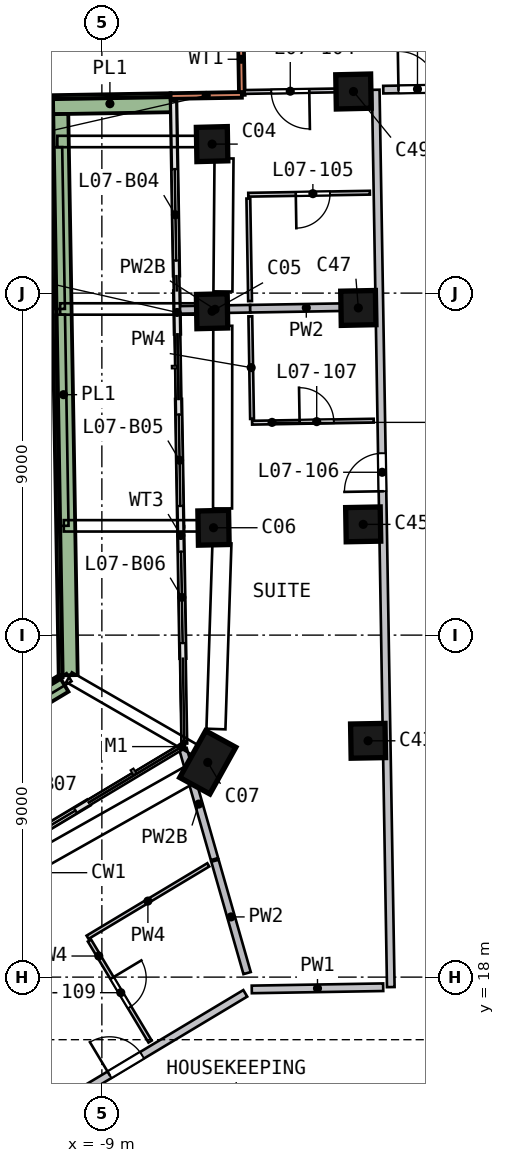
"""IFC4 building model, lengths in metres.
Left out: names, types, materials, properties, quantities, classifications, styles, units other than length and angle.
Written with IfcOpenShell. Run it as: python <this file> out.ifc"""

import sys

from ifc_helpers import new_model, si_unit, direction, frame, frame_2d, origin, origin_2d, place, context, subcontext, project, spatial, rectangle, extrude, element, fill, save


model = new_model("IFC4")
c1 = context("Model", 3, precision=1e-05, world=origin(), true_north=direction((0.0, 1.0)))
c2 = subcontext(c1, "Body", "Model", "MODEL_VIEW")
j1 = project(units=[si_unit("LENGTHUNIT", "METRE"), si_unit("PLANEANGLEUNIT", "RADIAN")], contexts=[c1])
p1 = place(None, origin())
s1 = spatial("IfcSite", under=j1, at=p1, CompositionType="ELEMENT")
p2 = place(p1, origin())
s2 = spatial("IfcBuilding", under=s1, at=p2, CompositionType="ELEMENT")
p3 = place(p2, frame((0.0, 0.0, 39.0)))
s3 = spatial("IfcBuildingStorey", under=s2, at=p3, CompositionType="ELEMENT", Elevation=39.0)
p4 = place(p3, frame((-5.871, 39.982, 0.0), z_axis=(-0.186896641, -0.049859128, 0.981113507), x_axis=(0.025350334, -0.998623416, -0.045919866)))
e1 = element("IfcColumn", 1, at=p4, inside=s3, PredefinedType="COLUMN", context=c2, shape_type="SweptSolid", body=[
    extrude(rectangle(XDim=0.9, YDim=0.8, at=origin_2d()), origin(), (0.0, 0.0, 1.0), 3.251),
])
p5 = place(p3, frame((-5.897, 35.576, 0.0), z_axis=(-0.167057669, -0.043045997, 0.985006994), x_axis=(0.023247701, -0.998940686, -0.039712094)))
e2 = element("IfcColumn", 2, at=p5, inside=s3, PredefinedType="COLUMN", context=c2, shape_type="SweptSolid", body=[
    extrude(rectangle(XDim=0.9, YDim=0.8, at=origin_2d()), origin(), (0.0, 0.0, 1.0), 3.239),
])
p6 = place(p3, frame((-5.891, 29.869, 0.0), z_axis=(-0.140990235, -0.036042617, 0.98935468), x_axis=(0.021432228, -0.999213991, -0.033347547)))
e3 = element("IfcColumn", 3, at=p6, inside=s3, PredefinedType="COLUMN", context=c2, shape_type="SweptSolid", body=[
    extrude(rectangle(XDim=0.9, YDim=0.8, at=origin_2d()), origin(), (0.0, 0.0, 1.0), 3.224),
])
p7 = place(p3, frame((-6.078, 23.686, 0.0), z_axis=(-0.112426319, -0.029797915, 0.993213173), x_axis=(0.478316462, 0.874501313, 0.080379195)))
e4 = element("IfcColumn", 4, at=p7, inside=s3, PredefinedType="COLUMN", context=c2, shape_type="SweptSolid", body=[
    extrude(rectangle(XDim=1.4, YDim=0.9, at=origin_2d()), origin(), (0.0, 0.0, 1.0), 3.212),
])
p8 = place(p3, frame((-1.856, 24.231, 0.0), z_axis=(-0.115172592, -0.009806775, 0.993297086), x_axis=(-0.017769532, 0.9998116, 0.007810719)))
e5 = element("IfcColumn", 5, at=p8, inside=s3, PredefinedType="COLUMN", context=c2, shape_type="SweptSolid", body=[
    extrude(rectangle(XDim=0.9, YDim=0.9, at=origin_2d()), origin(), (0.0, 0.0, 1.0), 3.211),
])
p9 = place(p3, frame((-1.952, 29.936, 0.0), z_axis=(-0.141505942, -0.017423109, 0.989784069), x_axis=(-0.018997454, 0.999708772, 0.014881813)))
e6 = element("IfcColumn", 6, at=p9, inside=s3, PredefinedType="COLUMN", context=c2, shape_type="SweptSolid", body=[
    extrude(rectangle(XDim=0.9, YDim=0.9, at=origin_2d()), origin(), (0.0, 0.0, 1.0), 3.223),
])
p10 = place(p3, frame((-2.047, 35.64, 0.0), z_axis=(-0.167600433, -0.024966581, 0.985538819), x_axis=(-0.020538414, 0.999550738, 0.021828788)))
e7 = element("IfcColumn", 7, at=p10, inside=s3, PredefinedType="COLUMN", context=c2, shape_type="SweptSolid", body=[
    extrude(rectangle(XDim=0.9, YDim=0.9, at=origin_2d()), origin(), (0.0, 0.0, 1.0), 3.237),
])
p11 = place(p3, frame((-2.143, 41.345, 0.0), z_axis=(-0.193255586, -0.032421908, 0.980612614), x_axis=(-0.022494025, 0.999337582, 0.028607969)))
e8 = element("IfcColumn", 8, at=p11, inside=s3, PredefinedType="COLUMN", context=c2, shape_type="SweptSolid", body=[
    extrude(rectangle(XDim=0.9, YDim=0.9, at=origin_2d()), origin(), (0.0, 0.0, 1.0), 3.253),
])
for number, where, z_axis, x_axis in (
    (9, (-5.348, 43.092, 0.0), (0.0, 0.0, 1.0), (0.017, -1.0, 0.0)),
    (10, (-5.316, 41.217, 0.0), (0.0, 0.0, 1.0), (-1.0, -0.017, 0.0)),
):
    element("IfcWall", number, at=place(p3, frame(where, z_axis=z_axis, x_axis=x_axis)), inside=s3, PredefinedType="SOLIDWALL", context=c2, shape_type="SweptSolid", body=[
        extrude(rectangle(XDim=1.875, YDim=0.15, at=frame_2d((0.938, 0.0))), origin(), (0.0, 0.0, 1.0), 3.19),
    ])
p12 = place(p3, frame((-7.114, 41.042, 0.0), z_axis=(0.0, 0.0, 1.0), x_axis=(0.016730938, -0.999860028, 0.0)))
e11 = element("IfcWall", 11, at=p12, inside=s3, PredefinedType="SOLIDWALL", context=c2, shape_type="SweptSolid", body=[
    extrude(rectangle(XDim=4.582, YDim=0.15, at=frame_2d((2.291, 0.0))), origin(), (0.0, 0.0, 1.0), 2.425),
])
p13 = place(p12, frame((1.782, 0.0, 0.0)))
e12 = element("IfcOpeningElement", 12, at=p13, cuts=e11, PredefinedType="OPENING", context=c2, shape_type="SweptSolid", body=[
    extrude(rectangle(XDim=2.4, YDim=2.4, at=frame_2d((1.2, 1.2))), frame((0.0, 0.085, 0.0), z_axis=(0.0, -1.0, 0.0), x_axis=(1.0, 0.0, 0.0)), (0.0, 0.0, 1.0), 0.17),
])
p14 = place(p3, frame((-6.982, 33.202, 0.0), z_axis=(0.0, 0.0, 1.0), x_axis=(0.016761493, -0.999859516, 0.0)))
e13 = element("IfcWall", 13, at=p14, inside=s3, PredefinedType="SOLIDWALL", context=c2, shape_type="SweptSolid", body=[
    extrude(rectangle(XDim=3.35, YDim=0.15, at=frame_2d((1.675, 0.0))), origin(), (0.0, 0.0, 1.0), 2.425),
])
p15 = place(p14, frame((0.4, 0.0, 0.0)))
e14 = element("IfcOpeningElement", 14, at=p15, cuts=e13, PredefinedType="OPENING", context=c2, shape_type="SweptSolid", body=[
    extrude(rectangle(XDim=2.4, YDim=2.4, at=frame_2d((1.2, 1.2))), frame((0.0, 0.085, 0.0), z_axis=(0.0, -1.0, 0.0), x_axis=(1.0, 0.0, 0.0)), (0.0, 0.0, 1.0), 0.17),
])
p16 = place(p3, frame((-6.926, 29.852, 0.0), z_axis=(0.0, 0.0, 1.0), x_axis=(0.01673022, -0.99986004, 0.0)))
e15 = element("IfcWall", 15, at=p16, inside=s3, PredefinedType="SOLIDWALL", context=c2, shape_type="SweptSolid", body=[
    extrude(rectangle(XDim=3.458, YDim=0.15, at=frame_2d((1.729, 0.0))), origin(), (0.0, 0.0, 1.0), 2.425),
])
p17 = place(p16, frame((0.659, 0.0, 0.0)))
e16 = element("IfcOpeningElement", 16, at=p17, cuts=e15, PredefinedType="OPENING", context=c2, shape_type="SweptSolid", body=[
    extrude(rectangle(XDim=2.4, YDim=2.4, at=frame_2d((1.2, 1.2))), frame((0.0, 0.085, 0.0), z_axis=(0.0, -1.0, 0.0), x_axis=(1.0, 0.0, 0.0)), (0.0, 0.0, 1.0), 0.17),
])
p18 = place(p3, frame((-7.03, 36.057, 0.0), z_axis=(0.0, 0.0, 1.0), x_axis=(0.01662837, -0.999861739, 0.0)))
e17 = element("IfcWall", 17, at=p18, inside=s3, PredefinedType="SOLIDWALL", context=c2, shape_type="SweptSolid", body=[
    extrude(rectangle(XDim=1.131, YDim=0.15, at=frame_2d((0.565, 0.0))), origin(), (0.0, 0.0, 1.0), 2.425),
])
p19 = place(p3, frame((-9.354, 22.59, 0.0), z_axis=(0.0, 0.0, 1.0), x_axis=(-0.857522843, -0.51444589, 0.0)))
e18 = element("IfcWall", 18, at=p19, inside=s3, PredefinedType="SOLIDWALL", context=c2, shape_type="SweptSolid", body=[
    extrude(rectangle(XDim=3.6, YDim=0.15, at=frame_2d((1.8, 0.0))), origin(), (0.0, 0.0, 1.0), 2.425),
])
p20 = place(p19, frame((0.4, 0.0, 0.0)))
e19 = element("IfcOpeningElement", 19, at=p20, cuts=e18, PredefinedType="OPENING", context=c2, shape_type="SweptSolid", body=[
    extrude(rectangle(XDim=2.4, YDim=2.4, at=frame_2d((1.2, 1.2))), frame((0.0, 0.085, 0.0), z_axis=(0.0, -1.0, 0.0), x_axis=(1.0, 0.0, 0.0)), (0.0, 0.0, 1.0), 0.17),
])
p21 = place(p3, frame((-7.189, 41.01, 0.0), z_axis=(0.0, 0.0, 1.0), x_axis=(-0.999860312, -0.016713946, 0.0)))
e20 = element("IfcWall", 20, at=p21, inside=s3, PredefinedType="SOLIDWALL", context=c2, shape_type="SweptSolid", body=[
    extrude(rectangle(XDim=3.199, YDim=0.5, at=frame_2d((1.6, 0.0))), origin(), (0.0, 0.0, 1.0), 0.7),
])
p22 = place(p3, frame((-10.134, 40.711, 0.0), z_axis=(0.0, 0.0, 1.0), x_axis=(0.016761578, -0.999859515, 0.0)))
e21 = element("IfcWall", 21, at=p22, inside=s3, PredefinedType="SOLIDWALL", context=c2, shape_type="SweptSolid", body=[
    extrude(rectangle(XDim=14.769, YDim=0.5, at=frame_2d((7.385, 0.0))), origin(), (0.0, 0.0, 1.0), 0.7),
])
p23 = place(p3, frame((-10.007, 25.725, 0.0), z_axis=(0.0, 0.0, 1.0), x_axis=(-0.857529623, -0.514434589, 0.0)))
e22 = element("IfcWall", 22, at=p23, inside=s3, PredefinedType="SOLIDWALL", context=c2, shape_type="SweptSolid", body=[
    extrude(rectangle(XDim=11.153, YDim=0.5, at=frame_2d((5.576, 0.0))), origin(), (0.0, 0.0, 1.0), 0.7),
])
p24 = place(p3, frame((-13.216, 12.781, 0.0), z_axis=(0.0, 0.0, 1.0), x_axis=(0.85751836, 0.514453362, 0.0)))
e23 = element("IfcWall", 23, at=p24, inside=s3, PredefinedType="SOLIDWALL", context=c2, shape_type="SweptSolid", body=[
    extrude(rectangle(XDim=9.316, YDim=0.2, at=frame_2d((4.658, 0.0))), origin(), (0.0, 0.0, 1.0), 3.19),
])
p25 = place(p24, frame((5.15, 0.0, 0.0)))
e24 = element("IfcOpeningElement", 24, at=p25, cuts=e23, PredefinedType="OPENING", context=c2, shape_type="SweptSolid", body=[
    extrude(rectangle(XDim=1.0, YDim=2.1, at=frame_2d((0.5, 1.05))), frame((0.0, 0.11, 0.0), z_axis=(0.0, -1.0, 0.0), x_axis=(1.0, 0.0, 0.0)), (0.0, 0.0, 1.0), 0.22),
])
p26 = place(p3, frame((-1.597, 17.734, 0.0), z_axis=(0.0, 0.0, 1.0), x_axis=(-0.999858837, -0.016801977, 0.0)))
e25 = element("IfcWall", 25, at=p26, inside=s3, PredefinedType="SOLIDWALL", context=c2, shape_type="SweptSolid", body=[
    extrude(rectangle(XDim=3.458, YDim=0.2, at=frame_2d((1.729, 0.0))), origin(), (0.0, 0.0, 1.0), 3.19),
])
p27 = place(p3, frame((-1.397, 17.738, 0.0), z_axis=(0.0, 0.0, 1.0), x_axis=(-0.016757192, 0.999859588, 0.0)))
e26 = element("IfcWall", 26, at=p27, inside=s3, PredefinedType="SOLIDWALL", context=c2, shape_type="SweptSolid", body=[
    extrude(rectangle(XDim=23.617, YDim=0.2, at=frame_2d((11.809, 0.0))), origin(), (0.0, 0.0, 1.0), 3.19),
])
p28 = place(p27, frame((13.05, 0.0, 0.0)))
e27 = element("IfcOpeningElement", 27, at=p28, cuts=e26, PredefinedType="OPENING", context=c2, shape_type="SweptSolid", body=[
    extrude(rectangle(XDim=1.0, YDim=2.1, at=frame_2d((0.5, 1.05))), frame((0.0, 0.11, 0.0), z_axis=(0.0, -1.0, 0.0), x_axis=(1.0, 0.0, 0.0)), (0.0, 0.0, 1.0), 0.22),
])
p29 = place(p3, frame((-1.595, 41.354, 0.0), z_axis=(0.0, 0.0, 1.0), x_axis=(0.999858912, 0.016797521, 0.0)))
e28 = element("IfcWall", 28, at=p29, inside=s3, PredefinedType="SOLIDWALL", context=c2, shape_type="SweptSolid", body=[
    extrude(rectangle(XDim=1.802, YDim=0.2, at=frame_2d((0.901, 0.0))), origin(), (0.0, 0.0, 1.0), 3.19),
])
p30 = place(p29, frame((0.4, 0.0, 0.0)))
e29 = element("IfcOpeningElement", 29, at=p30, cuts=e28, PredefinedType="OPENING", context=c2, shape_type="SweptSolid", body=[
    extrude(rectangle(XDim=1.0, YDim=2.1, at=frame_2d((0.5, 1.05))), frame((0.0, 0.11, 0.0), z_axis=(0.0, -1.0, 0.0), x_axis=(1.0, 0.0, 0.0)), (0.0, 0.0, 1.0), 0.22),
])
p31 = place(p3, frame((-6.036, 21.106, 0.0), z_axis=(0.0, 0.0, 1.0), x_axis=(-0.274999518, 0.961444364, 0.0)))
e30 = element("IfcWall", 30, at=p31, inside=s3, PredefinedType="SOLIDWALL", context=c2, shape_type="SweptSolid", body=[
    extrude(rectangle(XDim=3.011, YDim=0.2, at=frame_2d((1.506, 0.0))), origin(), (0.0, 0.0, 1.0), 2.69),
])
p32 = place(p3, frame((-5.097, 35.589, 0.0), z_axis=(0.0, 0.0, 1.0), x_axis=(-0.99985956, -0.016758897, 0.0)))
e31 = element("IfcWall", 31, at=p32, inside=s3, PredefinedType="SOLIDWALL", context=c2, shape_type="SweptSolid", body=[
    extrude(rectangle(XDim=1.85, YDim=0.2, at=frame_2d((0.925, 0.0))), origin(), (0.0, 0.0, 1.0), 2.69),
])
p33 = place(p3, frame((-5.178, 18.106, 0.0), z_axis=(0.0, 0.0, 1.0), x_axis=(-0.274983308, 0.961449, 0.0)))
e32 = element("IfcWall", 32, at=p33, inside=s3, PredefinedType="SOLIDWALL", context=c2, shape_type="SweptSolid", body=[
    extrude(rectangle(XDim=3.074, YDim=0.2, at=frame_2d((1.537, 0.0))), origin(), (0.0, 0.0, 1.0), 3.19),
])
p34 = place(p3, frame((-2.145, 35.639, 0.0), z_axis=(0.0, 0.0, 1.0), x_axis=(-0.999859135, -0.016784206, 0.0)))
e33 = element("IfcWall", 33, at=p34, inside=s3, PredefinedType="SOLIDWALL", context=c2, shape_type="SweptSolid", body=[
    extrude(rectangle(XDim=2.953, YDim=0.2, at=frame_2d((1.477, 0.0))), origin(), (0.0, 0.0, 1.0), 3.19),
])
p35 = place(p3, frame((-9.325, 18.963, 0.0), z_axis=(0.0, 0.0, 1.0), x_axis=(0.514414684, -0.857541563, 0.0)))
e34 = element("IfcWall", 34, at=p35, inside=s3, PredefinedType="PARTITIONING", context=c2, shape_type="SweptSolid", body=[
    extrude(rectangle(XDim=3.1, YDim=0.1, at=frame_2d((1.55, 0.0))), origin(), (0.0, 0.0, 1.0), 3.19),
])
p36 = place(p35, frame((1.15, 0.0, 0.0)))
e35 = element("IfcOpeningElement", 35, at=p36, cuts=e34, PredefinedType="OPENING", context=c2, shape_type="SweptSolid", body=[
    extrude(rectangle(XDim=0.9, YDim=2.1, at=frame_2d((0.45, 1.05))), frame((0.0, 0.06, 0.0), z_axis=(0.0, -1.0, 0.0), x_axis=(1.0, 0.0, 0.0)), (0.0, 0.0, 1.0), 0.12),
])
p37 = place(p3, frame((-9.377, 19.048, 0.0), z_axis=(0.0, 0.0, 1.0), x_axis=(0.857522003, 0.51444729, 0.0)))
e36 = element("IfcWall", 36, at=p37, inside=s3, PredefinedType="PARTITIONING", context=c2, shape_type="SweptSolid", body=[
    extrude(rectangle(XDim=3.704, YDim=0.1, at=frame_2d((1.852, 0.0))), origin(), (0.0, 0.0, 1.0), 3.19),
])
for number, where, z_axis, x_axis in (
    (37, (-5.146, 38.489, 0.0), (0.0, 0.0, 1.0), (0.017, -1.0, 0.0)),
    (38, (-5.048, 32.69, 0.0), (0.0, 0.0, 1.0), (-0.017, 1.0, 0.0)),
):
    element("IfcWall", number, at=place(p3, frame(where, z_axis=z_axis, x_axis=x_axis)), inside=s3, PredefinedType="PARTITIONING", context=c2, shape_type="SweptSolid", body=[
        extrude(rectangle(XDim=2.7, YDim=0.1, at=frame_2d((1.35, 0.0))), origin(), (0.0, 0.0, 1.0), 3.19),
    ])
p38 = place(p3, frame((-1.993, 41.348, 0.0), z_axis=(0.0, 0.0, 1.0), x_axis=(-0.999859865, -0.016740652, 0.0)))
e39 = element("IfcWall", 39, at=p38, inside=s3, PredefinedType="PARTITIONING", context=c2, shape_type="SweptSolid", body=[
    extrude(rectangle(XDim=3.252, YDim=0.1, at=frame_2d((1.626, 0.0))), origin(), (0.0, 0.0, 1.0), 3.19),
])
p39 = place(p38, frame((1.55, 0.0, 0.0)))
e40 = element("IfcOpeningElement", 40, at=p39, cuts=e39, PredefinedType="OPENING", context=c2, shape_type="SweptSolid", body=[
    extrude(rectangle(XDim=1.0, YDim=2.1, at=frame_2d((0.5, 1.05))), frame((0.0, 0.06, 0.0), z_axis=(0.0, -1.0, 0.0), x_axis=(1.0, 0.0, 0.0)), (0.0, 0.0, 1.0), 0.12),
])
p40 = place(p3, frame((-1.948, 38.642, 0.0), z_axis=(0.0, 0.0, 1.0), x_axis=(-0.999860397, -0.016708846, 0.0)))
e41 = element("IfcWall", 41, at=p40, inside=s3, PredefinedType="PARTITIONING", context=c2, shape_type="SweptSolid", body=[
    extrude(rectangle(XDim=3.2, YDim=0.1, at=frame_2d((1.6, 0.0))), origin(), (0.0, 0.0, 1.0), 3.19),
])
p41 = place(p40, frame((1.05, 0.0, 0.0)))
e42 = element("IfcOpeningElement", 42, at=p41, cuts=e41, PredefinedType="OPENING", context=c2, shape_type="SweptSolid", body=[
    extrude(rectangle(XDim=0.9, YDim=2.1, at=frame_2d((0.45, 1.05))), frame((0.0, 0.06, 0.0), z_axis=(0.0, -1.0, 0.0), x_axis=(1.0, 0.0, 0.0)), (0.0, 0.0, 1.0), 0.12),
])
p42 = place(p3, frame((-5.047, 32.59, 0.0), z_axis=(0.0, 0.0, 1.0), x_axis=(0.99985912, 0.016785121, 0.0)))
e43 = element("IfcWall", 43, at=p42, inside=s3, PredefinedType="PARTITIONING", context=c2, shape_type="SweptSolid", body=[
    extrude(rectangle(XDim=3.2, YDim=0.1, at=frame_2d((1.6, 0.0))), origin(), (0.0, 0.0, 1.0), 3.19),
])
p43 = place(p42, frame((1.25, 0.0, 0.0)))
e44 = element("IfcOpeningElement", 44, at=p43, cuts=e43, PredefinedType="OPENING", context=c2, shape_type="SweptSolid", body=[
    extrude(rectangle(XDim=0.9, YDim=2.1, at=frame_2d((0.45, 1.05))), frame((0.0, 0.06, 0.0), z_axis=(0.0, -1.0, 0.0), x_axis=(1.0, 0.0, 0.0)), (0.0, 0.0, 1.0), 0.12),
])
p44 = place(p13, origin())
e45 = element("IfcDoor", 45, at=p44, inside=s3, OperationType="SLIDING_TO_LEFT", PredefinedType="DOOR", context=c2, shape_type="SweptSolid", body=[
    extrude(rectangle(XDim=2.4, YDim=2.4, at=frame_2d((1.2, 1.2))), frame((0.0, 0.025, 0.0), z_axis=(0.0, -1.0, 0.0), x_axis=(1.0, 0.0, 0.0)), (0.0, 0.0, 1.0), 0.05),
])
fill(e12, e45)
p45 = place(p15, origin())
e46 = element("IfcDoor", 46, at=p45, inside=s3, OperationType="SLIDING_TO_RIGHT", PredefinedType="DOOR", context=c2, shape_type="SweptSolid", body=[
    extrude(rectangle(XDim=2.4, YDim=2.4, at=frame_2d((1.2, 1.2))), frame((0.0, 0.025, 0.0), z_axis=(0.0, -1.0, 0.0), x_axis=(1.0, 0.0, 0.0)), (0.0, 0.0, 1.0), 0.05),
])
fill(e14, e46)
p46 = place(p17, origin())
e47 = element("IfcDoor", 47, at=p46, inside=s3, OperationType="SLIDING_TO_LEFT", PredefinedType="DOOR", context=c2, shape_type="SweptSolid", body=[
    extrude(rectangle(XDim=2.4, YDim=2.4, at=frame_2d((1.2, 1.2))), frame((0.0, 0.025, 0.0), z_axis=(0.0, -1.0, 0.0), x_axis=(1.0, 0.0, 0.0)), (0.0, 0.0, 1.0), 0.05),
])
fill(e16, e47)
p47 = place(p20, origin())
e48 = element("IfcDoor", 48, at=p47, inside=s3, OperationType="SLIDING_TO_RIGHT", PredefinedType="DOOR", context=c2, shape_type="SweptSolid", body=[
    extrude(rectangle(XDim=2.4, YDim=2.4, at=frame_2d((1.2, 1.2))), frame((0.0, 0.025, 0.0), z_axis=(0.0, -1.0, 0.0), x_axis=(1.0, 0.0, 0.0)), (0.0, 0.0, 1.0), 0.05),
])
fill(e19, e48)
p48 = place(p30, origin())
e49 = element("IfcDoor", 49, at=p48, inside=s3, OperationType="SINGLE_SWING_LEFT", PredefinedType="DOOR", context=c2, shape_type="SweptSolid", body=[
    extrude(rectangle(XDim=1.0, YDim=2.1, at=frame_2d((0.5, 1.05))), frame((0.0, 0.025, 0.0), z_axis=(0.0, -1.0, 0.0), x_axis=(1.0, 0.0, 0.0)), (0.0, 0.0, 1.0), 0.05),
])
fill(e29, e49)
p49 = place(p39, origin())
e50 = element("IfcDoor", 50, at=p49, inside=s3, OperationType="SINGLE_SWING_LEFT", PredefinedType="DOOR", context=c2, shape_type="SweptSolid", body=[
    extrude(rectangle(XDim=1.0, YDim=2.1, at=frame_2d((0.5, 1.05))), frame((0.0, 0.025, 0.0), z_axis=(0.0, -1.0, 0.0), x_axis=(1.0, 0.0, 0.0)), (0.0, 0.0, 1.0), 0.05),
])
fill(e40, e50)
p50 = place(p41, origin())
e51 = element("IfcDoor", 51, at=p50, inside=s3, OperationType="SINGLE_SWING_RIGHT", PredefinedType="DOOR", context=c2, shape_type="SweptSolid", body=[
    extrude(rectangle(XDim=0.9, YDim=2.1, at=frame_2d((0.45, 1.05))), frame((0.0, 0.025, 0.0), z_axis=(0.0, -1.0, 0.0), x_axis=(1.0, 0.0, 0.0)), (0.0, 0.0, 1.0), 0.05),
])
fill(e42, e51)
p51 = place(p28, origin())
e52 = element("IfcDoor", 52, at=p51, inside=s3, OperationType="SINGLE_SWING_LEFT", PredefinedType="DOOR", context=c2, shape_type="SweptSolid", body=[
    extrude(rectangle(XDim=1.0, YDim=2.1, at=frame_2d((0.5, 1.05))), frame((0.0, 0.025, 0.0), z_axis=(0.0, -1.0, 0.0), x_axis=(1.0, 0.0, 0.0)), (0.0, 0.0, 1.0), 0.05),
])
fill(e27, e52)
p52 = place(p43, origin())
e53 = element("IfcDoor", 53, at=p52, inside=s3, OperationType="SINGLE_SWING_LEFT", PredefinedType="DOOR", context=c2, shape_type="SweptSolid", body=[
    extrude(rectangle(XDim=0.9, YDim=2.1, at=frame_2d((0.45, 1.05))), frame((0.0, 0.025, 0.0), z_axis=(0.0, -1.0, 0.0), x_axis=(1.0, 0.0, 0.0)), (0.0, 0.0, 1.0), 0.05),
])
fill(e44, e53)
p53 = place(p25, origin())
e54 = element("IfcDoor", 54, at=p53, inside=s3, OperationType="SINGLE_SWING_LEFT", PredefinedType="DOOR", context=c2, shape_type="SweptSolid", body=[
    extrude(rectangle(XDim=1.0, YDim=2.1, at=frame_2d((0.5, 1.05))), frame((0.0, 0.025, 0.0), z_axis=(0.0, -1.0, 0.0), x_axis=(1.0, 0.0, 0.0)), (0.0, 0.0, 1.0), 0.05),
])
fill(e24, e54)
p54 = place(p36, origin())
e55 = element("IfcDoor", 55, at=p54, inside=s3, OperationType="SINGLE_SWING_LEFT", PredefinedType="DOOR", context=c2, shape_type="SweptSolid", body=[
    extrude(rectangle(XDim=0.9, YDim=2.1, at=frame_2d((0.45, 1.05))), frame((0.0, 0.025, 0.0), z_axis=(0.0, -1.0, 0.0), x_axis=(1.0, 0.0, 0.0)), (0.0, 0.0, 1.0), 0.05),
])
fill(e35, e55)
save(model, sys.argv[1])
